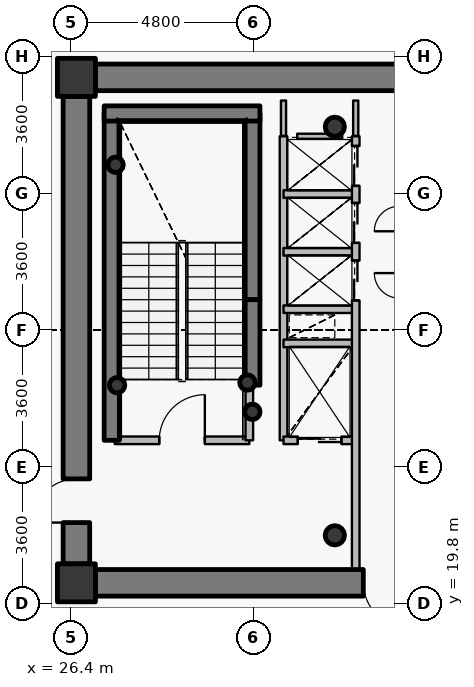
"""IFC4 building model, lengths in metres.
Left out: names, types, materials, properties, quantities, classifications, styles, units other than length and angle.
Written with IfcOpenShell. Run it as: python <this file> out.ifc"""

import sys

from ifc_helpers import new_model, si_unit, direction, frame, frame_2d, origin, origin_2d, place, context, subcontext, project, spatial, rectangle, hollow_circle, extrude, source, transform, mapped, element, fill, save


model = new_model("IFC4")
c1 = context("Model", 3, precision=1e-05, world=origin(), true_north=direction((0.0, 1.0)))
c2 = subcontext(c1, "Body", "Model", "MODEL_VIEW")
j1 = project(units=[si_unit("LENGTHUNIT", "METRE"), si_unit("PLANEANGLEUNIT", "RADIAN")], contexts=[c1])
p1 = place(None, origin())
s1 = spatial("IfcSite", under=j1, at=p1, CompositionType="ELEMENT")
p2 = place(p1, origin())
s2 = spatial("IfcBuilding", under=s1, at=p2, CompositionType="ELEMENT")
p3 = place(p2, frame((0.0, 0.0, 210.3)))
s3 = spatial("IfcBuildingStorey", under=s2, at=p3, CompositionType="ELEMENT", Elevation=210.3)
for number, where, z_axis, x_axis in (
    (1, (26.55, 20.35, 0.0), (0.0, 0.0, 1.0), (1.0, 0.0, 0.0)),
    (2, (26.55, 33.65, 0.0), (0.0, 0.0, 1.0), (1.0, 0.0, 0.0)),
):
    element("IfcColumn", number, at=place(p3, frame(where, z_axis=z_axis, x_axis=x_axis)), inside=s3, PredefinedType="COLUMN", context=c2, shape_type="SweptSolid", body=[
        extrude(rectangle(XDim=1.0, YDim=1.0, at=origin_2d()), origin(), (0.0, 0.0, 1.0), 3.75),
    ])
for number, where, z_axis, x_axis in (
    (3, (33.35, 21.6, 0.0), (0.0, 0.0, 1.0), (1.0, 0.0, 0.0)),
    (4, (33.35, 32.35, 0.0), (0.0, 0.0, 1.0), (1.0, 0.0, 0.0)),
):
    element("IfcColumn", number, at=place(p3, frame(where, z_axis=z_axis, x_axis=x_axis)), inside=s3, PredefinedType="COLUMN", context=c2, shape_type="SweptSolid", body=[
        extrude(hollow_circle(Radius=0.254, WallThickness=0.02, at=origin_2d()), origin(), (0.0, 0.0, 1.0), 3.75),
    ])
p4 = place(p3, frame((27.48, 24.1, 0.0), z_axis=(0.0, 0.0, 1.0), x_axis=(0.0, 1.0, 0.0)))
e5 = element("IfcWall", 5, at=p4, inside=s3, PredefinedType="SHEAR", context=c2, shape_type="SweptSolid", body=[
    extrude(rectangle(XDim=8.6, YDim=0.4, at=frame_2d((4.3, 0.0))), origin(), (0.0, 0.0, 1.0), 3.75),
])
p5 = place(p3, frame((31.18, 27.8, 0.0), z_axis=(0.0, 0.0, 1.0), x_axis=(0.0, 1.0, 0.0)))
e6 = element("IfcWall", 6, at=p5, inside=s3, PredefinedType="SHEAR", context=c2, shape_type="SweptSolid", body=[
    extrude(rectangle(XDim=4.9, YDim=0.4, at=frame_2d((2.45, 0.0))), origin(), (0.0, 0.0, 1.0), 3.75),
])
p6 = place(p3, frame((27.28, 32.7, 0.0), z_axis=(0.0, 0.0, 1.0), x_axis=(1.0, 0.0, 0.0)))
e7 = element("IfcWall", 7, at=p6, inside=s3, PredefinedType="SHEAR", context=c2, shape_type="SweptSolid", body=[
    extrude(rectangle(XDim=4.1, YDim=0.4, at=frame_2d((2.05, 0.0))), origin(), (0.0, 0.0, 1.0), 3.75),
])
for number, where, z_axis, x_axis in (
    (8, (27.58, 31.35, 0.0), (0.0, 0.0, 1.0), (1.0, 0.0, 0.0)),
    (9, (31.05, 25.62, 0.0), (0.0, 0.0, 1.0), (1.0, 0.0, 0.0)),
    (10, (31.18, 24.85, 0.0), (0.0, 0.0, 1.0), (1.0, 0.0, 0.0)),
    (11, (27.62, 25.55, 0.0), (0.0, 0.0, 1.0), (1.0, 0.0, 0.0)),
):
    element("IfcColumn", number, at=place(p3, frame(where, z_axis=z_axis, x_axis=x_axis)), inside=s3, PredefinedType="COLUMN", context=c2, shape_type="SweptSolid", body=[
        extrude(hollow_circle(Radius=0.203, WallThickness=0.016, at=origin_2d()), origin(), (0.0, 0.0, 1.0), 3.75),
    ])
p7 = place(p3, frame((27.05, 33.65, 0.0), z_axis=(0.0, 0.0, 1.0), x_axis=(1.0, 0.0, 0.0)))
e12 = element("IfcWall", 12, at=p7, inside=s3, PredefinedType="SHEAR", context=c2, shape_type="SweptSolid", body=[
    extrude(rectangle(XDim=17.9, YDim=0.7, at=frame_2d((8.95, 0.0))), origin(), (0.0, 0.0, 1.0), 3.05),
])
p8 = place(p7, frame((13.675, 0.0, 0.0)))
e13 = element("IfcOpeningElement", 13, at=p8, cuts=e12, PredefinedType="OPENING", context=c2, shape_type="SweptSolid", body=[
    extrude(rectangle(XDim=1.15, YDim=2.15, at=origin_2d()), frame((0.575, 0.36, 1.075), z_axis=(0.0, -1.0, 0.0), x_axis=(1.0, 0.0, 0.0)), (0.0, 0.0, 1.0), 0.72),
])
p9 = place(p3, frame((44.95, 20.35, 0.0), z_axis=(0.0, 0.0, 1.0), x_axis=(-1.0, 0.0, 0.0)))
e14 = element("IfcWall", 14, at=p9, inside=s3, PredefinedType="SHEAR", context=c2, shape_type="SweptSolid", body=[
    extrude(rectangle(XDim=17.9, YDim=0.7, at=frame_2d((8.95, 0.0))), origin(), (0.0, 0.0, 1.0), 3.05),
])
p10 = place(p9, frame((9.7, 0.0, 0.0)))
e15 = element("IfcOpeningElement", 15, at=p10, cuts=e14, PredefinedType="OPENING", context=c2, shape_type="SweptSolid", body=[
    extrude(rectangle(XDim=1.15, YDim=2.15, at=origin_2d()), frame((0.575, 0.36, 1.075), z_axis=(0.0, -1.0, 0.0), x_axis=(1.0, 0.0, 0.0)), (0.0, 0.0, 1.0), 0.72),
])
p11 = place(p3, frame((26.55, 20.85, 0.0), z_axis=(0.0, 0.0, 1.0), x_axis=(0.0, 1.0, 0.0)))
e16 = element("IfcWall", 16, at=p11, inside=s3, PredefinedType="SHEAR", context=c2, shape_type="SweptSolid", body=[
    extrude(rectangle(XDim=12.3, YDim=0.7, at=frame_2d((6.15, 0.0))), origin(), (0.0, 0.0, 1.0), 3.05),
])
p12 = place(p11, frame((1.085, 0.0, 0.0)))
e17 = element("IfcOpeningElement", 17, at=p12, cuts=e16, PredefinedType="OPENING", context=c2, shape_type="SweptSolid", body=[
    extrude(rectangle(XDim=1.15, YDim=2.15, at=origin_2d()), frame((0.575, 0.36, 1.075), z_axis=(0.0, -1.0, 0.0), x_axis=(1.0, 0.0, 0.0)), (0.0, 0.0, 1.0), 0.72),
])
p13 = place(p3, frame((31.18, 25.55, 0.0), z_axis=(0.0, 0.0, 1.0), x_axis=(0.0, 1.0, 0.0)))
e18 = element("IfcWall", 18, at=p13, inside=s3, PredefinedType="SHEAR", context=c2, shape_type="SweptSolid", body=[
    extrude(rectangle(XDim=2.25, YDim=0.4, at=frame_2d((1.125, 0.0))), origin(), (0.0, 0.0, 1.0), 3.1),
])
p14 = place(p3, frame((27.56, 24.1, 0.0), z_axis=(0.0, 0.0, 1.0), x_axis=(1.0, 0.0, 0.0)))
e19 = element("IfcWall", 19, at=p14, inside=s3, PredefinedType="PARTITIONING", context=c2, shape_type="SweptSolid", body=[
    extrude(rectangle(XDim=3.54, YDim=0.2, at=frame_2d((1.77, 0.0))), origin(), (0.0, 0.0, 1.0), 3.5),
])
p15 = place(p14, frame((1.17, 0.0, 0.0)))
e20 = element("IfcOpeningElement", 20, at=p15, cuts=e19, PredefinedType="OPENING", context=c2, shape_type="SweptSolid", body=[
    extrude(rectangle(XDim=1.2, YDim=2.15, at=origin_2d()), frame((0.6, 0.11, 1.075), z_axis=(0.0, -1.0, 0.0), x_axis=(1.0, 0.0, 0.0)), (0.0, 0.0, 1.0), 0.22),
])
p16 = place(p3, frame((31.1, 24.1, 0.0), z_axis=(0.0, 0.0, 1.0), x_axis=(0.0, 1.0, 0.0)))
e21 = element("IfcWall", 21, at=p16, inside=s3, PredefinedType="PARTITIONING", context=c2, shape_type="SweptSolid", body=[
    extrude(rectangle(XDim=1.44, YDim=0.2, at=frame_2d((0.72, 0.0))), origin(), (0.0, 0.0, 1.0), 3.5),
])
p17 = place(p3, frame((32.0, 24.1, 0.0), z_axis=(0.0, 0.0, 1.0), x_axis=(0.0, 1.0, 0.0)))
e22 = element("IfcWall", 22, at=p17, inside=s3, PredefinedType="PARTITIONING", context=c2, shape_type="SweptSolid", body=[
    extrude(rectangle(XDim=8.0, YDim=0.2, at=frame_2d((4.0, 0.0))), origin(), (0.0, 0.0, 1.0), 3.5),
])
p18 = place(p3, frame((32.0, 24.1, 0.0), z_axis=(0.0, 0.0, 1.0), x_axis=(1.0, 0.0, 0.0)))
e23 = element("IfcWall", 23, at=p18, inside=s3, PredefinedType="PARTITIONING", context=c2, shape_type="SweptSolid", body=[
    extrude(rectangle(XDim=1.9, YDim=0.2, at=frame_2d((0.95, 0.0))), origin(), (0.0, 0.0, 1.0), 3.085),
])
p19 = place(p18, frame((0.375, 0.0, 0.0)))
e24 = element("IfcOpeningElement", 24, at=p19, cuts=e23, PredefinedType="OPENING", context=c2, shape_type="SweptSolid", body=[
    extrude(rectangle(XDim=1.15, YDim=2.15, at=origin_2d()), frame((0.575, 0.11, 1.075), z_axis=(0.0, -1.0, 0.0), x_axis=(1.0, 0.0, 0.0)), (0.0, 0.0, 1.0), 0.22),
])
for number, where, z_axis, x_axis in (
    (25, (32.0, 26.65, 0.0), (0.0, 0.0, 1.0), (1.0, 0.0, 0.0)),
    (26, (32.0, 27.55, 0.0), (0.0, 0.0, 1.0), (1.0, 0.0, 0.0)),
    (27, (32.0, 29.06, 0.0), (0.0, 0.0, 1.0), (1.0, 0.0, 0.0)),
    (28, (32.0, 30.58, 0.0), (0.0, 0.0, 1.0), (1.0, 0.0, 0.0)),
):
    element("IfcWall", number, at=place(p3, frame(where, z_axis=z_axis, x_axis=x_axis)), inside=s3, PredefinedType="PARTITIONING", context=c2, shape_type="SweptSolid", body=[
        extrude(rectangle(XDim=1.9, YDim=0.2, at=frame_2d((0.95, 0.0))), origin(), (0.0, 0.0, 1.0), 3.085),
    ])
p20 = place(p3, frame((33.9, 20.7, 0.0), z_axis=(0.0, 0.0, 1.0), x_axis=(0.0, 1.0, 0.0)))
e29 = element("IfcWall", 29, at=p20, inside=s3, PredefinedType="PARTITIONING", context=c2, shape_type="SweptSolid", body=[
    extrude(rectangle(XDim=11.4, YDim=0.2, at=frame_2d((5.7, 0.0))), origin(), (0.0, 0.0, 1.0), 3.085),
])
p21 = place(p20, frame((7.08, 0.0, 0.0)))
e30 = element("IfcOpeningElement", 30, at=p21, cuts=e29, PredefinedType="OPENING", context=c2, shape_type="SweptSolid", body=[
    extrude(rectangle(XDim=1.05, YDim=2.15, at=origin_2d()), frame((0.525, 0.11, 1.075), z_axis=(0.0, -1.0, 0.0), x_axis=(1.0, 0.0, 0.0)), (0.0, 0.0, 1.0), 0.22),
])
p22 = place(p20, frame((8.595, 0.0, 0.0)))
e31 = element("IfcOpeningElement", 31, at=p22, cuts=e29, PredefinedType="OPENING", context=c2, shape_type="SweptSolid", body=[
    extrude(rectangle(XDim=1.05, YDim=2.15, at=origin_2d()), frame((0.525, 0.11, 1.075), z_axis=(0.0, -1.0, 0.0), x_axis=(1.0, 0.0, 0.0)), (0.0, 0.0, 1.0), 0.22),
])
p23 = place(p20, frame((10.095, 0.0, 0.0)))
e32 = element("IfcOpeningElement", 32, at=p23, cuts=e29, PredefinedType="OPENING", context=c2, shape_type="SweptSolid", body=[
    extrude(rectangle(XDim=1.05, YDim=2.15, at=origin_2d()), frame((0.525, 0.11, 1.075), z_axis=(0.0, -1.0, 0.0), x_axis=(1.0, 0.0, 0.0)), (0.0, 0.0, 1.0), 0.22),
])
p24 = place(p3, frame((32.36, 32.1, 0.0), z_axis=(0.0, 0.0, 1.0), x_axis=(1.0, 0.0, 0.0)))
e33 = element("IfcWall", 33, at=p24, inside=s3, PredefinedType="PARTITIONING", context=c2, shape_type="SweptSolid", body=[
    extrude(rectangle(XDim=1.18, YDim=0.135, at=frame_2d((0.59, 0.0))), origin(), (0.0, 0.0, 1.0), 3.085),
])
p25 = place(p3, frame((32.0, 33.04, 0.0), z_axis=(0.0, 0.0, 1.0), x_axis=(0.0, -1.0, 0.0)))
e34 = element("IfcWall", 34, at=p25, inside=s3, PredefinedType="PARTITIONING", context=c2, shape_type="SweptSolid", body=[
    extrude(rectangle(XDim=0.93, YDim=0.135, at=frame_2d((0.465, 0.0))), origin(), (0.0, 0.0, 1.0), 3.035),
])
p26 = place(p3, frame((33.9, 32.11, 0.0), z_axis=(0.0, 0.0, 1.0), x_axis=(0.0, 1.0, 0.0)))
e35 = element("IfcWall", 35, at=p26, inside=s3, PredefinedType="PARTITIONING", context=c2, shape_type="SweptSolid", body=[
    extrude(rectangle(XDim=0.93, YDim=0.135, at=frame_2d((0.465, 0.0))), origin(), (0.0, 0.0, 1.0), 3.085),
])
p27 = place(p3, frame((27.04, 34.0, 0.0), z_axis=(0.0, 0.0, 1.0), x_axis=(-1.0, 0.0, 0.0)))
e36 = element("IfcWall", 36, at=p27, inside=s3, PredefinedType="PARTITIONING", context=c2, shape_type="SweptSolid", body=[
    extrude(rectangle(XDim=0.84, YDim=0.135, at=frame_2d((0.42, 0.0))), origin(), (0.0, 0.0, 1.0), 2.935),
])
p28 = place(p3, frame((26.2, 33.692, 0.0), z_axis=(0.0, 0.0, 1.0), x_axis=(0.0, -1.0, 0.0)))
e37 = element("IfcWall", 37, at=p28, inside=s3, PredefinedType="PARTITIONING", context=c2, shape_type="SweptSolid", body=[
    extrude(rectangle(XDim=0.532, YDim=0.135, at=frame_2d((0.266, 0.0))), origin(), (0.0, 0.0, 1.0), 3.5),
])
p29 = place(p3, frame((26.2, 20.84, 0.0), z_axis=(0.0, 0.0, 1.0), x_axis=(0.0, -1.0, 0.0)))
e38 = element("IfcWall", 38, at=p29, inside=s3, PredefinedType="PARTITIONING", context=c2, shape_type="SweptSolid", body=[
    extrude(rectangle(XDim=0.84, YDim=0.135, at=frame_2d((0.42, 0.0))), origin(), (0.0, 0.0, 1.0), 3.5),
])
p30 = place(p3, frame((26.508, 20.0, 0.0), z_axis=(0.0, 0.0, 1.0), x_axis=(1.0, 0.0, 0.0)))
e39 = element("IfcWall", 39, at=p30, inside=s3, PredefinedType="PARTITIONING", context=c2, shape_type="SweptSolid", body=[
    extrude(rectangle(XDim=0.532, YDim=0.135, at=frame_2d((0.266, 0.0))), origin(), (0.0, 0.0, 1.0), 2.935),
])
m1 = source(origin(), c2, "Body", "SweptSolid", [
    extrude(rectangle(XDim=1.15, YDim=2.15, at=origin_2d()), frame((0.575, 0.025, 1.075), z_axis=(0.0, -1.0, 0.0), x_axis=(1.0, 0.0, 0.0)), (0.0, 0.0, 1.0), 0.05),
])
p31 = place(p12, origin())
e40 = element("IfcDoor", 40, at=p31, inside=s3, OperationType="SINGLE_SWING_LEFT", PredefinedType="DOOR", context=c2, shape_type="MappedRepresentation", body=[
    mapped(m1, transform((0.0, 0.0, 0.0), x_axis=(1.0, 0.0, 0.0), y_axis=(0.0, 1.0, 0.0), z_axis=(0.0, 0.0, 1.0), scale=1.0)),
])
fill(e17, e40)
p32 = place(p10, origin())
e41 = element("IfcDoor", 41, at=p32, inside=s3, OperationType="SINGLE_SWING_LEFT", PredefinedType="DOOR", context=c2, shape_type="MappedRepresentation", body=[
    mapped(m1, transform((0.0, 0.0, 0.0), x_axis=(1.0, 0.0, 0.0), y_axis=(0.0, 1.0, 0.0), z_axis=(0.0, 0.0, 1.0), scale=1.0)),
])
fill(e15, e41)
m2 = source(origin(), c2, "Body", "SweptSolid", [
    extrude(rectangle(XDim=1.2, YDim=2.15, at=origin_2d()), frame((0.6, 0.025, 1.075), z_axis=(0.0, -1.0, 0.0), x_axis=(1.0, 0.0, 0.0)), (0.0, 0.0, 1.0), 0.05),
])
p33 = place(p15, origin())
e42 = element("IfcDoor", 42, at=p33, inside=s3, OperationType="SINGLE_SWING_RIGHT", PredefinedType="DOOR", context=c2, shape_type="MappedRepresentation", body=[
    mapped(m2, transform((0.0, 0.0, 0.0), x_axis=(1.0, 0.0, 0.0), y_axis=(0.0, 1.0, 0.0), z_axis=(0.0, 0.0, 1.0), scale=1.0)),
])
fill(e20, e42)
m3 = source(origin(), c2, "Body", "SweptSolid", [
    extrude(rectangle(XDim=1.15, YDim=2.15, at=origin_2d()), frame((0.575, 0.025, 1.075), z_axis=(0.0, -1.0, 0.0), x_axis=(1.0, 0.0, 0.0)), (0.0, 0.0, 1.0), 0.05),
])
p34 = place(p19, origin())
e43 = element("IfcDoor", 43, at=p34, inside=s3, OperationType="DOUBLE_DOOR_SLIDING", PredefinedType="USERDEFINED", context=c2, shape_type="MappedRepresentation", body=[
    mapped(m3, transform((0.0, 0.0, 0.0), x_axis=(1.0, 0.0, 0.0), y_axis=(0.0, 1.0, 0.0), z_axis=(0.0, 0.0, 1.0), scale=1.0)),
])
fill(e24, e43)
m4 = source(origin(), c2, "Body", "SweptSolid", [
    extrude(rectangle(XDim=1.05, YDim=2.15, at=origin_2d()), frame((0.525, 0.025, 1.075), z_axis=(0.0, -1.0, 0.0), x_axis=(1.0, 0.0, 0.0)), (0.0, 0.0, 1.0), 0.05),
])
p35 = place(p21, origin())
e44 = element("IfcDoor", 44, at=p35, inside=s3, OperationType="DOUBLE_DOOR_SLIDING", PredefinedType="USERDEFINED", context=c2, shape_type="MappedRepresentation", body=[
    mapped(m4, transform((0.0, 0.0, 0.0), x_axis=(1.0, 0.0, 0.0), y_axis=(0.0, 1.0, 0.0), z_axis=(0.0, 0.0, 1.0), scale=1.0)),
])
fill(e30, e44)
p36 = place(p22, origin())
e45 = element("IfcDoor", 45, at=p36, inside=s3, OperationType="DOUBLE_DOOR_SLIDING", PredefinedType="USERDEFINED", context=c2, shape_type="MappedRepresentation", body=[
    mapped(m4, transform((0.0, 0.0, 0.0), x_axis=(1.0, 0.0, 0.0), y_axis=(0.0, 1.0, 0.0), z_axis=(0.0, 0.0, 1.0), scale=1.0)),
])
fill(e31, e45)
p37 = place(p23, origin())
e46 = element("IfcDoor", 46, at=p37, inside=s3, OperationType="DOUBLE_DOOR_SLIDING", PredefinedType="USERDEFINED", context=c2, shape_type="MappedRepresentation", body=[
    mapped(m4, transform((0.0, 0.0, 0.0), x_axis=(1.0, 0.0, 0.0), y_axis=(0.0, 1.0, 0.0), z_axis=(0.0, 0.0, 1.0), scale=1.0)),
])
fill(e32, e46)
save(model, sys.argv[1])
